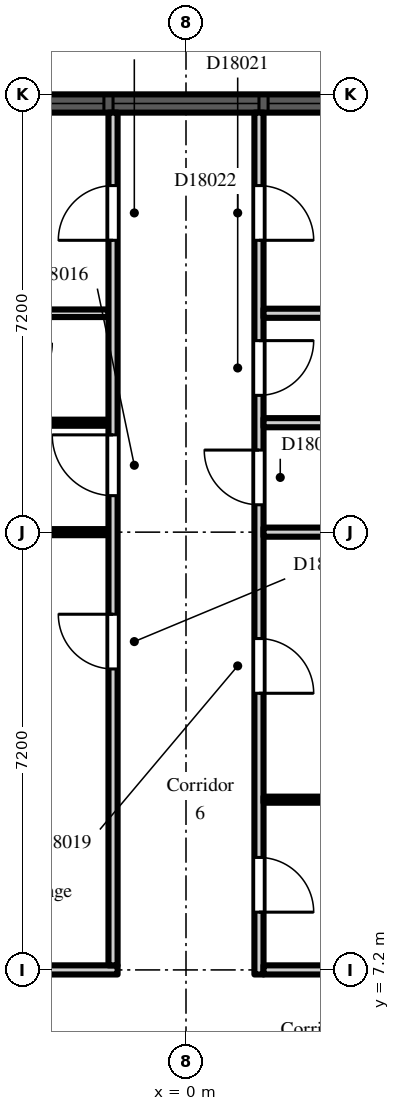
"""IFC4 building model, lengths in metres.
Left out: names, types, materials, properties, quantities, classifications, styles, units other than length and angle.
Written with IfcOpenShell. Run it as: python <this file> out.ifc"""

import sys

from ifc_helpers import new_model, si_unit, direction, frame, frame_2d, origin, place, context, subcontext, project, spatial, rectangle, extrude, element, fill, save


model = new_model("IFC4")
c1 = context("Model", 3, precision=1e-05, world=origin(), true_north=direction((0.0, 1.0)))
c2 = subcontext(c1, "Body", "Model", "MODEL_VIEW")
j1 = project(units=[si_unit("LENGTHUNIT", "METRE"), si_unit("PLANEANGLEUNIT", "RADIAN")], contexts=[c1])
p1 = place(None, origin())
s1 = spatial("IfcSite", under=j1, at=p1, CompositionType="ELEMENT")
p2 = place(p1, origin())
s2 = spatial("IfcBuilding", under=s1, at=p2, CompositionType="ELEMENT")
p3 = place(p2, frame((0.0, 0.0, 123.3)))
s3 = spatial("IfcBuildingStorey", under=s2, at=p3, CompositionType="ELEMENT", Elevation=123.3)
p4 = place(p3, frame((2.7, 21.45, 0.0), z_axis=(0.0, 0.0, 1.0), x_axis=(-1.0, 0.0, 0.0)))
e1 = element("IfcWall", 1, at=p4, inside=s3, PredefinedType="SOLIDWALL", context=c2, shape_type="SweptSolid", body=[
    extrude(rectangle(XDim=5.4, YDim=0.3, at=frame_2d((2.7, 0.0))), origin(), (0.0, 0.0, 1.0), 2.2),
])
p5 = place(p4, frame((1.5, 0.0, 0.2)))
e2 = element("IfcOpeningElement", 2, at=p5, cuts=e1, PredefinedType="OPENING", context=c2, shape_type="SweptSolid", body=[
    extrude(rectangle(XDim=2.4, YDim=1.85, at=frame_2d((1.2, 0.925))), frame((0.0, 0.16, 0.0), z_axis=(0.0, -1.0, 0.0), x_axis=(1.0, 0.0, 0.0)), (0.0, 0.0, 1.0), 0.32),
])
p6 = place(p4, frame((0.15, 0.0, 0.2)))
e3 = element("IfcOpeningElement", 3, at=p6, cuts=e1, PredefinedType="OPENING", context=c2, shape_type="SweptSolid", body=[
    extrude(rectangle(XDim=1.2, YDim=1.85, at=frame_2d((0.6, 0.925))), frame((0.0, 0.16, 0.0), z_axis=(0.0, -1.0, 0.0), x_axis=(1.0, 0.0, 0.0)), (0.0, 0.0, 1.0), 0.32),
])
p7 = place(p4, frame((4.05, 0.0, 0.2)))
e4 = element("IfcOpeningElement", 4, at=p7, cuts=e1, PredefinedType="OPENING", context=c2, shape_type="SweptSolid", body=[
    extrude(rectangle(XDim=1.2, YDim=1.85, at=frame_2d((0.6, 0.925))), frame((0.0, 0.16, 0.0), z_axis=(0.0, -1.0, 0.0), x_axis=(1.0, 0.0, 0.0)), (0.0, 0.0, 1.0), 0.32),
])
p8 = place(p3, frame((-3.9, 7.2, 0.0), z_axis=(0.0, 0.0, 1.0), x_axis=(1.0, 0.0, 0.0)))
e5 = element("IfcWall", 5, at=p8, inside=s3, PredefinedType="PARTITIONING", context=c2, shape_type="SweptSolid", body=[
    extrude(rectangle(XDim=2.775, YDim=0.15, at=frame_2d((1.387, 0.0))), origin(), (0.0, 0.0, 1.0), 2.6),
])
p9 = place(p3, frame((-3.9, 14.4, 0.0), z_axis=(0.0, 0.0, 1.0), x_axis=(1.0, 0.0, 0.0)))
e6 = element("IfcWall", 6, at=p9, inside=s3, PredefinedType="PARTITIONING", context=c2, shape_type="SweptSolid", body=[
    extrude(rectangle(XDim=2.625, YDim=0.1, at=frame_2d((1.312, 0.0))), origin(), (0.0, 0.0, 1.0), 2.6),
])
p10 = place(p3, frame((-2.95, 16.2, 0.0), z_axis=(0.0, 0.0, 1.0), x_axis=(1.0, 0.0, 0.0)))
e7 = element("IfcWall", 7, at=p10, inside=s3, PredefinedType="PARTITIONING", context=c2, shape_type="SweptSolid", body=[
    extrude(rectangle(XDim=1.675, YDim=0.1, at=frame_2d((0.837, 0.0))), origin(), (0.0, 0.0, 1.0), 2.6),
])
p11 = place(p3, frame((-3.0, 18.0, 0.0), z_axis=(0.0, 0.0, 1.0), x_axis=(1.0, 0.0, 0.0)))
e8 = element("IfcWall", 8, at=p11, inside=s3, PredefinedType="PARTITIONING", context=c2, shape_type="SweptSolid", body=[
    extrude(rectangle(XDim=1.725, YDim=0.125, at=frame_2d((0.863, 0.0))), origin(), (0.0, 0.0, 1.0), 2.6),
])
p12 = place(p3, frame((-1.2, 7.275, 0.0), z_axis=(0.0, 0.0, 1.0), x_axis=(0.0, 1.0, 0.0)))
e9 = element("IfcWall", 9, at=p12, inside=s3, PredefinedType="PARTITIONING", context=c2, shape_type="SweptSolid", body=[
    extrude(rectangle(XDim=14.025, YDim=0.15, at=frame_2d((7.013, 0.0))), origin(), (0.0, 0.0, 1.0), 2.6),
])
p13 = place(p12, frame((4.875, 0.0, 0.0)))
e10 = element("IfcOpeningElement", 10, at=p13, cuts=e9, PredefinedType="OPENING", context=c2, shape_type="SweptSolid", body=[
    extrude(rectangle(XDim=0.9, YDim=2.1, at=frame_2d((0.45, 1.05))), frame((0.0, 0.085, 0.0), z_axis=(0.0, -1.0, 0.0), x_axis=(1.0, 0.0, 0.0)), (0.0, 0.0, 1.0), 0.17),
])
p14 = place(p12, frame((7.725, 0.0, 0.0)))
e11 = element("IfcOpeningElement", 11, at=p14, cuts=e9, PredefinedType="OPENING", context=c2, shape_type="SweptSolid", body=[
    extrude(rectangle(XDim=1.0, YDim=2.1, at=frame_2d((0.5, 1.05))), frame((0.0, 0.085, 0.0), z_axis=(0.0, -1.0, 0.0), x_axis=(1.0, 0.0, 0.0)), (0.0, 0.0, 1.0), 0.17),
])
p15 = place(p12, frame((11.925, 0.0, 0.0)))
e12 = element("IfcOpeningElement", 12, at=p15, cuts=e9, PredefinedType="OPENING", context=c2, shape_type="SweptSolid", body=[
    extrude(rectangle(XDim=0.9, YDim=2.1, at=frame_2d((0.45, 1.05))), frame((0.0, 0.085, 0.0), z_axis=(0.0, -1.0, 0.0), x_axis=(1.0, 0.0, 0.0)), (0.0, 0.0, 1.0), 0.17),
])
p16 = place(p3, frame((1.2, 7.125, 0.0), z_axis=(0.0, 0.0, 1.0), x_axis=(0.0, 1.0, 0.0)))
e13 = element("IfcWall", 13, at=p16, inside=s3, PredefinedType="PARTITIONING", context=c2, shape_type="SweptSolid", body=[
    extrude(rectangle(XDim=14.175, YDim=0.15, at=frame_2d((7.087, 0.0))), origin(), (0.0, 0.0, 1.0), 2.6),
])
p17 = place(p16, frame((1.025, 0.0, 0.0)))
e14 = element("IfcOpeningElement", 14, at=p17, cuts=e13, PredefinedType="OPENING", context=c2, shape_type="SweptSolid", body=[
    extrude(rectangle(XDim=0.9, YDim=2.1, at=frame_2d((0.45, 1.05))), frame((0.0, 0.085, 0.0), z_axis=(0.0, -1.0, 0.0), x_axis=(1.0, 0.0, 0.0)), (0.0, 0.0, 1.0), 0.17),
])
p18 = place(p16, frame((4.625, 0.0, 0.0)))
e15 = element("IfcOpeningElement", 15, at=p18, cuts=e13, PredefinedType="OPENING", context=c2, shape_type="SweptSolid", body=[
    extrude(rectangle(XDim=0.9, YDim=2.1, at=frame_2d((0.45, 1.05))), frame((0.0, 0.085, 0.0), z_axis=(0.0, -1.0, 0.0), x_axis=(1.0, 0.0, 0.0)), (0.0, 0.0, 1.0), 0.17),
])
p19 = place(p16, frame((7.725, 0.0, 0.0)))
e16 = element("IfcOpeningElement", 16, at=p19, cuts=e13, PredefinedType="OPENING", context=c2, shape_type="SweptSolid", body=[
    extrude(rectangle(XDim=0.9, YDim=2.1, at=frame_2d((0.45, 1.05))), frame((0.0, 0.085, 0.0), z_axis=(0.0, -1.0, 0.0), x_axis=(1.0, 0.0, 0.0)), (0.0, 0.0, 1.0), 0.17),
])
p20 = place(p16, frame((9.525, 0.0, 0.0)))
e17 = element("IfcOpeningElement", 17, at=p20, cuts=e13, PredefinedType="OPENING", context=c2, shape_type="SweptSolid", body=[
    extrude(rectangle(XDim=0.9, YDim=2.1, at=frame_2d((0.45, 1.05))), frame((0.0, 0.085, 0.0), z_axis=(0.0, -1.0, 0.0), x_axis=(1.0, 0.0, 0.0)), (0.0, 0.0, 1.0), 0.17),
])
p21 = place(p16, frame((12.075, 0.0, 0.0)))
e18 = element("IfcOpeningElement", 18, at=p21, cuts=e13, PredefinedType="OPENING", context=c2, shape_type="SweptSolid", body=[
    extrude(rectangle(XDim=0.9, YDim=2.1, at=frame_2d((0.45, 1.05))), frame((0.0, 0.085, 0.0), z_axis=(0.0, -1.0, 0.0), x_axis=(1.0, 0.0, 0.0)), (0.0, 0.0, 1.0), 0.17),
])
p22 = place(p3, frame((1.275, 7.2, 0.0), z_axis=(0.0, 0.0, 1.0), x_axis=(1.0, 0.0, 0.0)))
e19 = element("IfcWall", 19, at=p22, inside=s3, PredefinedType="PARTITIONING", context=c2, shape_type="SweptSolid", body=[
    extrude(rectangle(XDim=2.625, YDim=0.15, at=frame_2d((1.312, 0.0))), origin(), (0.0, 0.0, 1.0), 2.6),
])
p23 = place(p3, frame((1.275, 10.0, 0.0), z_axis=(0.0, 0.0, 1.0), x_axis=(1.0, 0.0, 0.0)))
e20 = element("IfcWall", 20, at=p23, inside=s3, PredefinedType="PARTITIONING", context=c2, shape_type="SweptSolid", body=[
    extrude(rectangle(XDim=2.625, YDim=0.1, at=frame_2d((1.312, 0.0))), origin(), (0.0, 0.0, 1.0), 2.6),
])
p24 = place(p3, frame((1.275, 14.4, 0.0), z_axis=(0.0, 0.0, 1.0), x_axis=(1.0, 0.0, 0.0)))
e21 = element("IfcWall", 21, at=p24, inside=s3, PredefinedType="PARTITIONING", context=c2, shape_type="SweptSolid", body=[
    extrude(rectangle(XDim=2.625, YDim=0.15, at=frame_2d((1.312, 0.0))), origin(), (0.0, 0.0, 1.0), 2.6),
])
p25 = place(p3, frame((1.275, 16.2, 0.0), z_axis=(0.0, 0.0, 1.0), x_axis=(1.0, 0.0, 0.0)))
e22 = element("IfcWall", 22, at=p25, inside=s3, PredefinedType="PARTITIONING", context=c2, shape_type="SweptSolid", body=[
    extrude(rectangle(XDim=5.625, YDim=0.15, at=frame_2d((2.812, 0.0))), origin(), (0.0, 0.0, 1.0), 2.6),
])
p26 = place(p3, frame((1.275, 18.0, 0.0), z_axis=(0.0, 0.0, 1.0), x_axis=(1.0, 0.0, 0.0)))
e23 = element("IfcWall", 23, at=p26, inside=s3, PredefinedType="PARTITIONING", context=c2, shape_type="SweptSolid", body=[
    extrude(rectangle(XDim=3.825, YDim=0.15, at=frame_2d((1.913, 0.0))), origin(), (0.0, 0.0, 1.0), 2.6),
])
p27 = place(p5, origin())
e24 = element("IfcWindow", 24, at=p27, inside=s3, PartitioningType="SINGLE_PANEL", PredefinedType="WINDOW", context=c2, shape_type="SweptSolid", body=[
    extrude(rectangle(XDim=2.4, YDim=1.85, at=frame_2d((1.2, 0.925))), frame((0.0, 0.03, 0.0), z_axis=(0.0, -1.0, 0.0), x_axis=(1.0, 0.0, 0.0)), (0.0, 0.0, 1.0), 0.06),
])
fill(e2, e24)
p28 = place(p6, origin())
e25 = element("IfcWindow", 25, at=p28, inside=s3, PartitioningType="SINGLE_PANEL", PredefinedType="WINDOW", context=c2, shape_type="SweptSolid", body=[
    extrude(rectangle(XDim=1.2, YDim=1.85, at=frame_2d((0.6, 0.925))), frame((0.0, 0.03, 0.0), z_axis=(0.0, -1.0, 0.0), x_axis=(1.0, 0.0, 0.0)), (0.0, 0.0, 1.0), 0.06),
])
fill(e3, e25)
p29 = place(p7, origin())
e26 = element("IfcWindow", 26, at=p29, inside=s3, PartitioningType="SINGLE_PANEL", PredefinedType="WINDOW", context=c2, shape_type="SweptSolid", body=[
    extrude(rectangle(XDim=1.2, YDim=1.85, at=frame_2d((0.6, 0.925))), frame((0.0, 0.03, 0.0), z_axis=(0.0, -1.0, 0.0), x_axis=(1.0, 0.0, 0.0)), (0.0, 0.0, 1.0), 0.06),
])
fill(e4, e26)
p30 = place(p13, origin())
e27 = element("IfcDoor", 27, at=p30, inside=s3, OperationType="SINGLE_SWING_RIGHT", PredefinedType="DOOR", context=c2, shape_type="SweptSolid", body=[
    extrude(rectangle(XDim=0.9, YDim=2.1, at=frame_2d((0.45, 1.05))), frame((0.0, 0.025, 0.0), z_axis=(0.0, -1.0, 0.0), x_axis=(1.0, 0.0, 0.0)), (0.0, 0.0, 1.0), 0.05),
])
fill(e10, e27)
p31 = place(p14, origin())
e28 = element("IfcDoor", 28, at=p31, inside=s3, OperationType="SINGLE_SWING_RIGHT", PredefinedType="DOOR", context=c2, shape_type="SweptSolid", body=[
    extrude(rectangle(XDim=1.0, YDim=2.1, at=frame_2d((0.5, 1.05))), frame((0.0, 0.025, 0.0), z_axis=(0.0, -1.0, 0.0), x_axis=(1.0, 0.0, 0.0)), (0.0, 0.0, 1.0), 0.05),
])
fill(e11, e28)
p32 = place(p15, origin())
e29 = element("IfcDoor", 29, at=p32, inside=s3, OperationType="SINGLE_SWING_LEFT", PredefinedType="DOOR", context=c2, shape_type="SweptSolid", body=[
    extrude(rectangle(XDim=0.9, YDim=2.1, at=frame_2d((0.45, 1.05))), frame((0.0, 0.025, 0.0), z_axis=(0.0, -1.0, 0.0), x_axis=(1.0, 0.0, 0.0)), (0.0, 0.0, 1.0), 0.05),
])
fill(e12, e29)
p33 = place(p17, frame((0.9, 0.0, 0.0), z_axis=(0.0, 0.0, 1.0), x_axis=(-1.0, 0.0, 0.0)))
e30 = element("IfcDoor", 30, at=p33, inside=s3, OperationType="SINGLE_SWING_RIGHT", PredefinedType="DOOR", context=c2, shape_type="SweptSolid", body=[
    extrude(rectangle(XDim=0.9, YDim=2.1, at=frame_2d((0.45, 1.05))), frame((0.0, 0.025, 0.0), z_axis=(0.0, -1.0, 0.0), x_axis=(1.0, 0.0, 0.0)), (0.0, 0.0, 1.0), 0.05),
])
fill(e14, e30)
p34 = place(p18, frame((0.9, 0.0, 0.0), z_axis=(0.0, 0.0, 1.0), x_axis=(-1.0, 0.0, 0.0)))
e31 = element("IfcDoor", 31, at=p34, inside=s3, OperationType="SINGLE_SWING_RIGHT", PredefinedType="DOOR", context=c2, shape_type="SweptSolid", body=[
    extrude(rectangle(XDim=0.9, YDim=2.1, at=frame_2d((0.45, 1.05))), frame((0.0, 0.025, 0.0), z_axis=(0.0, -1.0, 0.0), x_axis=(1.0, 0.0, 0.0)), (0.0, 0.0, 1.0), 0.05),
])
fill(e15, e31)
p35 = place(p19, origin())
e32 = element("IfcDoor", 32, at=p35, inside=s3, OperationType="SINGLE_SWING_RIGHT", PredefinedType="DOOR", context=c2, shape_type="SweptSolid", body=[
    extrude(rectangle(XDim=0.9, YDim=2.1, at=frame_2d((0.45, 1.05))), frame((0.0, 0.025, 0.0), z_axis=(0.0, -1.0, 0.0), x_axis=(1.0, 0.0, 0.0)), (0.0, 0.0, 1.0), 0.05),
])
fill(e16, e32)
p36 = place(p20, frame((0.9, 0.0, 0.0), z_axis=(0.0, 0.0, 1.0), x_axis=(-1.0, 0.0, 0.0)))
e33 = element("IfcDoor", 33, at=p36, inside=s3, OperationType="SINGLE_SWING_LEFT", PredefinedType="DOOR", context=c2, shape_type="SweptSolid", body=[
    extrude(rectangle(XDim=0.9, YDim=2.1, at=frame_2d((0.45, 1.05))), frame((0.0, 0.025, 0.0), z_axis=(0.0, -1.0, 0.0), x_axis=(1.0, 0.0, 0.0)), (0.0, 0.0, 1.0), 0.05),
])
fill(e17, e33)
p37 = place(p21, frame((0.9, 0.0, 0.0), z_axis=(0.0, 0.0, 1.0), x_axis=(-1.0, 0.0, 0.0)))
e34 = element("IfcDoor", 34, at=p37, inside=s3, OperationType="SINGLE_SWING_RIGHT", PredefinedType="DOOR", context=c2, shape_type="SweptSolid", body=[
    extrude(rectangle(XDim=0.9, YDim=2.1, at=frame_2d((0.45, 1.05))), frame((0.0, 0.025, 0.0), z_axis=(0.0, -1.0, 0.0), x_axis=(1.0, 0.0, 0.0)), (0.0, 0.0, 1.0), 0.05),
])
fill(e18, e34)
save(model, sys.argv[1])
